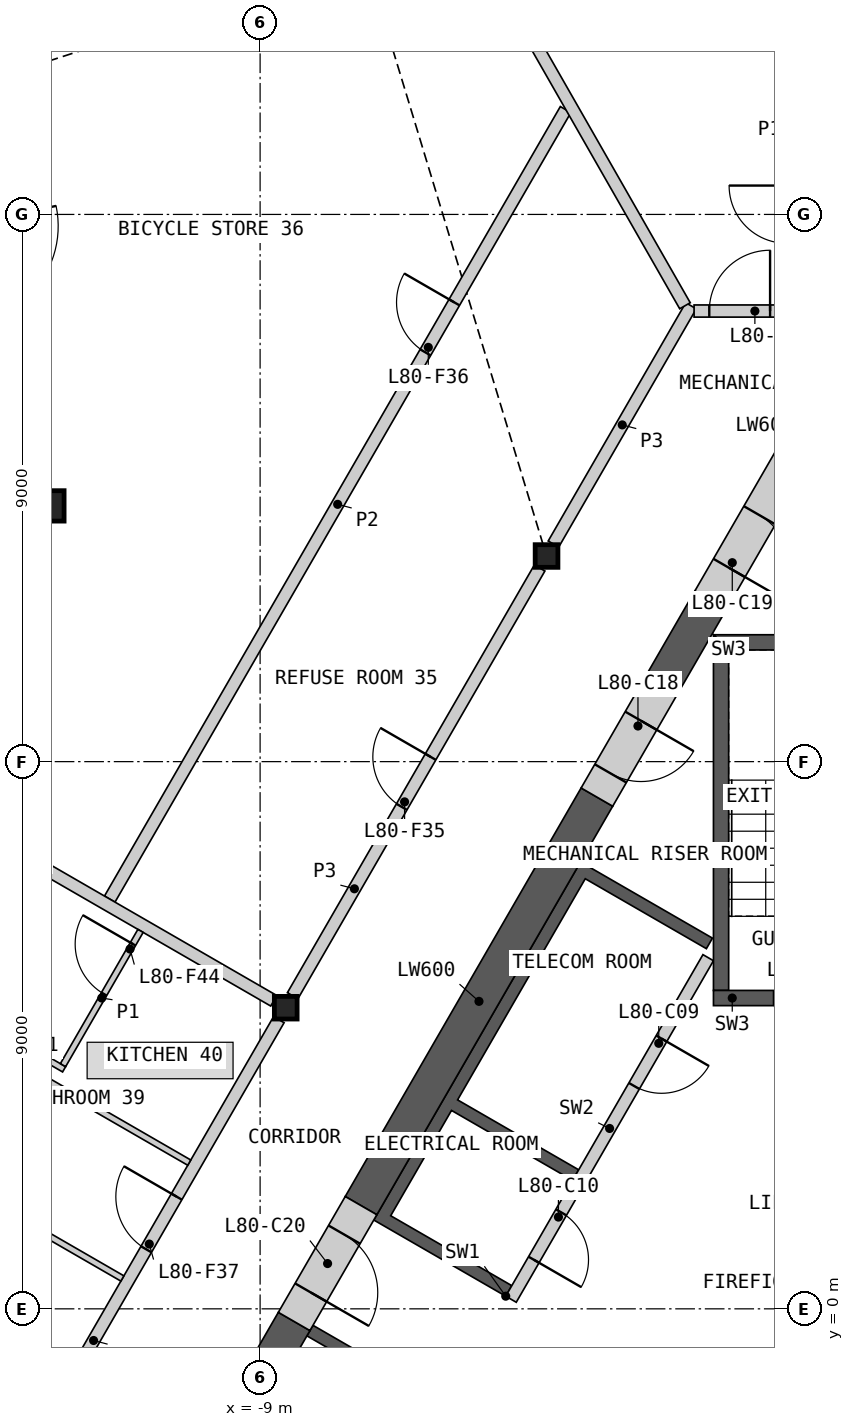
"""IFC4 building model, lengths in metres.
Left out: names, types, materials, properties, quantities, classifications, styles, units other than length and angle.
Written with IfcOpenShell. Run it as: python <this file> out.ifc"""

import sys

from ifc_helpers import new_model, si_unit, direction, frame, frame_2d, origin, origin_2d, place, context, subcontext, project, spatial, polyline, rectangle, hollow_rectangle, i_section, outline, extrude, element, fill, save


model = new_model("IFC4")
c1 = context("Model", 3, precision=1e-05, world=origin(), true_north=direction((0.0, 1.0)))
c2 = subcontext(c1, "Body", "Model", "MODEL_VIEW")
j1 = project(units=[si_unit("LENGTHUNIT", "METRE"), si_unit("PLANEANGLEUNIT", "RADIAN")], contexts=[c1])
p1 = place(None, origin())
s1 = spatial("IfcSite", under=j1, at=p1, CompositionType="ELEMENT")
p2 = place(p1, origin())
s2 = spatial("IfcBuilding", under=s1, at=p2, CompositionType="ELEMENT")
p3 = place(p2, frame((0.0, 0.0, 361.0)))
s3 = spatial("IfcBuildingStorey", under=s2, at=p3, CompositionType="ELEMENT", Elevation=361.0)
p4 = place(p3, frame((-12.474, 13.206, 0.0), z_axis=(0.0, 0.0, 1.0), x_axis=(1.0, 0.0, 0.0)))
e1 = element("IfcColumn", 1, at=p4, inside=s3, PredefinedType="COLUMN", context=c2, shape_type="SweptSolid", body=[
    extrude(hollow_rectangle(XDim=0.5, YDim=0.5, WallThickness=0.03, at=origin_2d()), origin(), (0.0, 0.0, 1.0), 3.4),
])
for number, where, z_axis, x_axis in (
    (2, (-4.289, 12.382, 0.0), (0.0, 0.0, 1.0), (1.0, 0.0, 0.0)),
    (3, (-8.578, 4.953, 0.0), (0.0, 0.0, 1.0), (1.0, 0.0, 0.0)),
):
    element("IfcColumn", number, at=place(p3, frame(where, z_axis=z_axis, x_axis=x_axis)), inside=s3, PredefinedType="COLUMN", context=c2, shape_type="SweptSolid", body=[
        extrude(i_section(OverallWidth=0.374, OverallDepth=0.372, WebThickness=0.016, FlangeThickness=0.026, at=origin_2d()), origin(), (0.0, 0.0, 1.0), 3.4),
    ])
p5 = place(p3, origin())
e4 = element("IfcWall", 4, at=p5, inside=s3, PredefinedType="SHEAR", context=c2, shape_type="SweptSolid", body=[
    extrude(outline(polyline([(-6.061, -1.697), (-8.231, -0.444), (-8.131, -0.271), (-5.96, -1.524), (-6.061, -1.697)])), origin(), (0.0, 0.0, 1.0), 3.1),
])
p6 = place(p3, origin())
e5 = element("IfcWall", 5, at=p6, inside=s3, PredefinedType="SHEAR", context=c2, shape_type="SweptSolid", body=[
    extrude(outline(polyline([(-4.96, 0.208), (-7.131, 1.461), (-3.731, 7.35), (-1.561, 6.097), (-1.66, 5.924), (-3.652, 7.074), (-5.752, 3.437), (-3.76, 2.287), (-3.861, 2.113), (-5.852, 3.263), (-6.852, 1.531), (-4.861, 0.381), (-4.96, 0.208)])), origin(), (0.0, 0.0, 1.0), 3.1),
])
p7 = place(p3, frame((-1.631, 5.776, 0.0), z_axis=(0.0, 0.0, 1.0), x_axis=(-0.499992876559, -0.866029516466, 0.0)))
e6 = element("IfcWall", 6, at=p7, inside=s3, PredefinedType="SOLIDWALL", context=c2, shape_type="SweptSolid", body=[
    extrude(rectangle(XDim=6.486, YDim=0.2, at=frame_2d((3.243, 0.0))), origin(), (0.0, 0.0, 1.0), 3.1),
])
p8 = place(p7, frame((1.537, 0.0, 0.0)))
e7 = element("IfcOpeningElement", 7, at=p8, cuts=e6, PredefinedType="OPENING", context=c2, shape_type="SweptSolid", body=[
    extrude(rectangle(XDim=0.9, YDim=2.1, at=frame_2d((0.45, 1.05))), frame((0.0, 0.11, 0.0), z_axis=(0.0, -1.0, 0.0), x_axis=(1.0, 0.0, 0.0)), (0.0, 0.0, 1.0), 0.22),
])
p9 = place(p7, frame((4.837, 0.0, 0.0)))
e8 = element("IfcOpeningElement", 8, at=p9, cuts=e6, PredefinedType="OPENING", context=c2, shape_type="SweptSolid", body=[
    extrude(rectangle(XDim=0.9, YDim=2.1, at=frame_2d((0.45, 1.05))), frame((0.0, 0.11, 0.0), z_axis=(0.0, -1.0, 0.0), x_axis=(1.0, 0.0, 0.0)), (0.0, 0.0, 1.0), 0.22),
])
p10 = place(p3, origin())
e9 = element("IfcWall", 9, at=p10, inside=s3, PredefinedType="SHEAR", context=c2, shape_type="SweptSolid", body=[
    extrude(outline(polyline([(1.544, 11.087), (-1.544, 11.087), (-1.294, 10.837), (1.294, 10.837), (1.544, 11.087)])), origin(), (0.0, 0.0, 1.0), 3.1),
])
p11 = place(p3, origin())
e10 = element("IfcWall", 10, at=p11, inside=s3, PredefinedType="SHEAR", context=c2, shape_type="SweptSolid", body=[
    extrude(outline(polyline([(-1.294, 10.837), (-1.544, 11.087), (-1.544, 5.237), (-1.294, 5.237), (-1.294, 10.837)])), origin(), (0.0, 0.0, 1.0), 3.1),
])
p12 = place(p3, frame((1.544, 5.112, 0.0), z_axis=(0.0, 0.0, 1.0), x_axis=(-1.0, 0.0, 0.0)))
e11 = element("IfcWall", 11, at=p12, inside=s3, PredefinedType="SHEAR", context=c2, shape_type="SweptSolid", body=[
    extrude(rectangle(XDim=3.088, YDim=0.25, at=frame_2d((1.544, 0.0))), origin(), (0.0, 0.0, 1.0), 3.1),
])
p13 = place(p12, frame((0.994, 0.0, 0.0)))
e12 = element("IfcOpeningElement", 12, at=p13, cuts=e11, PredefinedType="OPENING", context=c2, shape_type="SweptSolid", body=[
    extrude(rectangle(XDim=1.1, YDim=2.1, at=frame_2d((0.55, 1.05))), frame((0.0, 0.135, 0.0), z_axis=(0.0, -1.0, 0.0), x_axis=(1.0, 0.0, 0.0)), (0.0, 0.0, 1.0), 0.27),
])
p14 = place(p3, frame((-3.461, 8.417, 0.0), z_axis=(0.0, 0.0, 1.0), x_axis=(-0.50000391502, -0.866023143435, 0.0)))
e13 = element("IfcWall", 13, at=p14, inside=s3, PredefinedType="SHEAR", context=c2, shape_type="SweptSolid", body=[
    extrude(rectangle(XDim=7.759, YDim=0.6, at=frame_2d((3.879, 0.0))), origin(), (0.0, 0.0, 1.0), 3.1),
])
p15 = place(p3, frame((-8.44, -0.208, 0.0), z_axis=(0.0, 0.0, 1.0), x_axis=(-0.500007425856, -0.866021116422, 0.0)))
e14 = element("IfcWall", 14, at=p15, inside=s3, PredefinedType="SHEAR", context=c2, shape_type="SweptSolid", body=[
    extrude(rectangle(XDim=4.969, YDim=0.6, at=frame_2d((2.484, 0.0))), origin(), (0.0, 0.0, 1.0), 3.1),
])
p16 = place(p3, frame((-1.59, 11.658, 0.0), z_axis=(0.0, 0.0, 1.0), x_axis=(-0.500037594623, -0.866003697431, 0.0)))
e15 = element("IfcWall", 15, at=p16, inside=s3, PredefinedType="SHEAR", context=c2, shape_type="SweptSolid", body=[
    extrude(rectangle(XDim=1.542, YDim=0.6, at=frame_2d((0.771, 0.0))), origin(), (0.0, 0.0, 1.0), 3.1),
])
p17 = place(p3, frame((-2.361, 10.322, 0.0), z_axis=(0.0, 0.0, 1.0), x_axis=(-0.499946605688, -0.86605622881, 0.0)))
e16 = element("IfcWall", 16, at=p17, inside=s3, PredefinedType="SHEAR", context=c2, shape_type="SweptSolid", body=[
    extrude(rectangle(XDim=2.2, YDim=0.6, at=frame_2d((1.1, 0.0))), origin(), (0.0, 0.0, 1.0), 3.1),
])
p18 = place(p17, frame((0.75, 0.0, 0.0)))
e17 = element("IfcOpeningElement", 17, at=p18, cuts=e16, PredefinedType="OPENING", context=c2, shape_type="SweptSolid", body=[
    extrude(rectangle(XDim=1.0, YDim=2.1, at=frame_2d((0.5, 1.05))), frame((0.0, 0.31, 0.0), z_axis=(0.0, -1.0, 0.0), x_axis=(1.0, 0.0, 0.0)), (0.0, 0.0, 1.0), 0.62),
])
p19 = place(p3, frame((-0.26, 13.961, 0.0), z_axis=(0.0, 0.0, 1.0), x_axis=(-0.49997936161, -0.866037319036, 0.0)))
e18 = element("IfcWall", 18, at=p19, inside=s3, PredefinedType="SHEAR", context=c2, shape_type="SweptSolid", body=[
    extrude(rectangle(XDim=2.66, YDim=0.6, at=frame_2d((1.33, 0.0))), origin(), (0.0, 0.0, 1.0), 3.1),
])
p20 = place(p19, frame((1.05, 0.0, 0.0)))
e19 = element("IfcOpeningElement", 19, at=p20, cuts=e18, PredefinedType="OPENING", context=c2, shape_type="SweptSolid", body=[
    extrude(rectangle(XDim=1.0, YDim=2.1, at=frame_2d((0.5, 1.05))), frame((0.0, 0.31, 0.0), z_axis=(0.0, -1.0, 0.0), x_axis=(1.0, 0.0, 0.0)), (0.0, 0.0, 1.0), 0.62),
])
p21 = place(p3, frame((-7.34, 1.698, 0.0), z_axis=(0.0, 0.0, 1.0), x_axis=(-0.50002983664, -0.866008176907, 0.0)))
e20 = element("IfcWall", 20, at=p21, inside=s3, PredefinedType="SHEAR", context=c2, shape_type="SweptSolid", body=[
    extrude(rectangle(XDim=2.2, YDim=0.6, at=frame_2d((1.1, 0.0))), origin(), (0.0, 0.0, 1.0), 3.1),
])
p22 = place(p21, frame((0.55, 0.0, 0.0)))
e21 = element("IfcOpeningElement", 21, at=p22, cuts=e20, PredefinedType="OPENING", context=c2, shape_type="SweptSolid", body=[
    extrude(rectangle(XDim=1.1, YDim=2.1, at=frame_2d((0.55, 1.05))), frame((0.0, 0.31, 0.0), z_axis=(0.0, -1.0, 0.0), x_axis=(1.0, 0.0, 0.0)), (0.0, 0.0, 1.0), 0.62),
])
p23 = place(p3, frame((-8.465, 5.15, 0.0), z_axis=(0.0, 0.0, 1.0), x_axis=(0.499992155518, 0.866029932751, 0.0)))
e22 = element("IfcWall", 22, at=p23, inside=s3, PredefinedType="PARTITIONING", context=c2, shape_type="SweptSolid", body=[
    extrude(rectangle(XDim=8.123, YDim=0.2, at=frame_2d((4.062, 0.0))), origin(), (0.0, 0.0, 1.0), 3.1),
])
p24 = place(p23, frame((3.587, 0.0, 0.0)))
e23 = element("IfcOpeningElement", 23, at=p24, cuts=e22, PredefinedType="OPENING", context=c2, shape_type="SweptSolid", body=[
    extrude(rectangle(XDim=0.95, YDim=2.1, at=frame_2d((0.475, 1.05))), frame((0.0, 0.11, 0.0), z_axis=(0.0, -1.0, 0.0), x_axis=(1.0, 0.0, 0.0)), (0.0, 0.0, 1.0), 0.22),
])
p25 = place(p3, frame((-12.754, -2.279, 0.0), z_axis=(0.0, 0.0, 1.0), x_axis=(0.500001682468, 0.866024432409, 0.0)))
e24 = element("IfcWall", 24, at=p25, inside=s3, PredefinedType="PARTITIONING", context=c2, shape_type="SweptSolid", body=[
    extrude(rectangle(XDim=8.124, YDim=0.2, at=frame_2d((4.062, 0.0))), origin(), (0.0, 0.0, 1.0), 3.1),
])
p26 = place(p25, frame((3.762, 0.0, 0.0)))
e25 = element("IfcOpeningElement", 25, at=p26, cuts=e24, PredefinedType="OPENING", context=c2, shape_type="SweptSolid", body=[
    extrude(rectangle(XDim=1.0, YDim=2.1, at=frame_2d((0.5, 1.05))), frame((0.0, 0.11, 0.0), z_axis=(0.0, -1.0, 0.0), x_axis=(1.0, 0.0, 0.0)), (0.0, 0.0, 1.0), 0.22),
])
p27 = place(p3, frame((-4.176, 12.579, 0.0), z_axis=(0.0, 0.0, 1.0), x_axis=(0.499974648164, 0.866040040179, 0.0)))
e26 = element("IfcWall", 26, at=p27, inside=s3, PredefinedType="PARTITIONING", context=c2, shape_type="SweptSolid", body=[
    extrude(rectangle(XDim=4.525, YDim=0.2, at=frame_2d((2.263, 0.0))), origin(), (0.0, 0.0, 1.0), 3.1),
])
p28 = place(p3, frame((-1.863, 16.411, 0.0), z_axis=(0.0, 0.0, 1.0), x_axis=(1.0, 0.0, 0.0)))
e27 = element("IfcWall", 27, at=p28, inside=s3, PredefinedType="PARTITIONING", context=c2, shape_type="SweptSolid", body=[
    extrude(rectangle(XDim=3.701, YDim=0.2, at=frame_2d((1.851, 0.0))), origin(), (0.0, 0.0, 1.0), 3.1),
])
p29 = place(p28, frame((0.25, 0.0, 0.0)))
e28 = element("IfcOpeningElement", 28, at=p29, cuts=e27, PredefinedType="OPENING", context=c2, shape_type="SweptSolid", body=[
    extrude(rectangle(XDim=1.0, YDim=2.1, at=frame_2d((0.5, 1.05))), frame((0.0, 0.11, 0.0), z_axis=(0.0, -1.0, 0.0), x_axis=(1.0, 0.0, 0.0)), (0.0, 0.0, 1.0), 0.22),
])
p30 = place(p3, frame((-11.473, 6.74, 0.0), z_axis=(0.0, 0.0, 1.0), x_axis=(0.499993542657, 0.866029131901, 0.0)))
e29 = element("IfcWall", 29, at=p30, inside=s3, PredefinedType="PARTITIONING", context=c2, shape_type="SweptSolid", body=[
    extrude(rectangle(XDim=14.994, YDim=0.2, at=frame_2d((7.497, 0.0))), origin(), (0.0, 0.0, 1.0), 2.33),
])
p31 = place(p30, frame((10.383, 0.0, 0.0)))
e30 = element("IfcOpeningElement", 30, at=p31, cuts=e29, PredefinedType="OPENING", context=c2, shape_type="SweptSolid", body=[
    extrude(rectangle(XDim=0.95, YDim=2.1, at=frame_2d((0.475, 1.05))), frame((0.0, 0.11, 0.0), z_axis=(0.0, -1.0, 0.0), x_axis=(1.0, 0.0, 0.0)), (0.0, 0.0, 1.0), 0.22),
])
p32 = place(p3, frame((-9.362, 29.352, 0.0), z_axis=(0.0, 0.0, 1.0), x_axis=(0.496351997927, -0.868121359116, 0.0)))
e31 = element("IfcWall", 31, at=p32, inside=s3, PredefinedType="PARTITIONING", context=c2, shape_type="SweptSolid", body=[
    extrude(rectangle(XDim=14.807, YDim=0.2, at=frame_2d((7.404, 0.0))), origin(), (0.0, 0.0, 1.0), 2.33),
])
p33 = place(p3, frame((-18.869, 10.894, 0.0), z_axis=(0.0, 0.0, 1.0), x_axis=(0.866023724155, -0.500002909193, 0.0)))
e32 = element("IfcWall", 32, at=p33, inside=s3, PredefinedType="PARTITIONING", context=c2, shape_type="SweptSolid", body=[
    extrude(rectangle(XDim=11.655, YDim=0.2, at=frame_2d((5.827, 0.0))), origin(), (0.0, 0.0, 1.0), 2.33),
])
p34 = place(p3, frame((-17.414, 4.049, 0.0), z_axis=(0.0, 0.0, 1.0), x_axis=(0.866033839264, -0.499985389037, 0.0)))
e33 = element("IfcWall", 33, at=p34, inside=s3, PredefinedType="PARTITIONING", context=c2, shape_type="SweptSolid", body=[
    extrude(rectangle(XDim=7.1, YDim=0.1, at=frame_2d((3.55, 0.0))), origin(), (0.0, 0.0, 1.0), 2.33),
])
p35 = place(p34, frame((1.158, 0.0, 0.0)))
e34 = element("IfcOpeningElement", 34, at=p35, cuts=e33, PredefinedType="OPENING", context=c2, shape_type="SweptSolid", body=[
    extrude(rectangle(XDim=0.95, YDim=2.1, at=frame_2d((0.475, 1.05))), frame((0.0, 0.06, 0.0), z_axis=(0.0, -1.0, 0.0), x_axis=(1.0, 0.0, 0.0)), (0.0, 0.0, 1.0), 0.12),
])
p36 = place(p3, frame((-15.318, 5.38, 0.0), z_axis=(0.0, 0.0, 1.0), x_axis=(0.866035260786, -0.499982926783, 0.0)))
e35 = element("IfcWall", 35, at=p36, inside=s3, PredefinedType="PARTITIONING", context=c2, shape_type="SweptSolid", body=[
    extrude(rectangle(XDim=5.95, YDim=0.1, at=frame_2d((2.975, 0.0))), origin(), (0.0, 0.0, 1.0), 2.33),
])
p37 = place(p3, frame((-14.735, 5.389, 0.0), z_axis=(0.0, 0.0, 1.0), x_axis=(0.866032775405, -0.499987231761, 0.0)))
e36 = element("IfcWall", 36, at=p37, inside=s3, PredefinedType="PARTITIONING", context=c2, shape_type="SweptSolid", body=[
    extrude(rectangle(XDim=2.9, YDim=0.1, at=frame_2d((1.45, 0.0))), origin(), (0.0, 0.0, 1.0), 2.33),
])
p38 = place(p3, frame((-12.242, 4.008, 0.0), z_axis=(0.0, 0.0, 1.0), x_axis=(0.499948979701, 0.866054858364, 0.0)))
e37 = element("IfcWall", 37, at=p38, inside=s3, PredefinedType="PARTITIONING", context=c2, shape_type="SweptSolid", body=[
    extrude(rectangle(XDim=2.55, YDim=0.1, at=frame_2d((1.275, 0.0))), origin(), (0.0, 0.0, 1.0), 2.33),
])
p39 = place(p38, frame((1.35, 0.0, 0.0)))
e38 = element("IfcOpeningElement", 38, at=p39, cuts=e37, PredefinedType="OPENING", context=c2, shape_type="SweptSolid", body=[
    extrude(rectangle(XDim=0.95, YDim=2.1, at=frame_2d((0.475, 1.05))), frame((0.0, 0.06, 0.0), z_axis=(0.0, -1.0, 0.0), x_axis=(1.0, 0.0, 0.0)), (0.0, 0.0, 1.0), 0.12),
])
p40 = place(p8, origin())
e39 = element("IfcDoor", 39, at=p40, inside=s3, OperationType="SINGLE_SWING_LEFT", PredefinedType="DOOR", context=c2, shape_type="SweptSolid", body=[
    extrude(rectangle(XDim=0.9, YDim=2.1, at=frame_2d((0.45, 1.05))), frame((0.0, 0.025, 0.0), z_axis=(0.0, -1.0, 0.0), x_axis=(1.0, 0.0, 0.0)), (0.0, 0.0, 1.0), 0.05),
])
fill(e7, e39)
p41 = place(p9, origin())
e40 = element("IfcDoor", 40, at=p41, inside=s3, OperationType="SINGLE_SWING_RIGHT", PredefinedType="DOOR", context=c2, shape_type="SweptSolid", body=[
    extrude(rectangle(XDim=0.9, YDim=2.1, at=frame_2d((0.45, 1.05))), frame((0.0, 0.025, 0.0), z_axis=(0.0, -1.0, 0.0), x_axis=(1.0, 0.0, 0.0)), (0.0, 0.0, 1.0), 0.05),
])
fill(e8, e40)
p42 = place(p13, origin())
e41 = element("IfcDoor", 41, at=p42, inside=s3, OperationType="SINGLE_SWING_LEFT", PredefinedType="DOOR", context=c2, shape_type="SweptSolid", body=[
    extrude(rectangle(XDim=1.1, YDim=2.1, at=frame_2d((0.55, 1.05))), frame((0.0, 0.025, 0.0), z_axis=(0.0, -1.0, 0.0), x_axis=(1.0, 0.0, 0.0)), (0.0, 0.0, 1.0), 0.05),
])
fill(e12, e41)
p43 = place(p18, origin())
e42 = element("IfcDoor", 42, at=p43, inside=s3, OperationType="SINGLE_SWING_LEFT", PredefinedType="DOOR", context=c2, shape_type="SweptSolid", body=[
    extrude(rectangle(XDim=1.0, YDim=2.1, at=frame_2d((0.5, 1.05))), frame((0.0, 0.055, 0.0), z_axis=(0.0, -1.0, 0.0), x_axis=(1.0, 0.0, 0.0)), (0.0, 0.0, 1.0), 0.05),
])
fill(e17, e42)
p44 = place(p20, origin())
e43 = element("IfcDoor", 43, at=p44, inside=s3, OperationType="SINGLE_SWING_RIGHT", PredefinedType="DOOR", context=c2, shape_type="SweptSolid", body=[
    extrude(rectangle(XDim=1.0, YDim=2.1, at=frame_2d((0.5, 1.05))), frame((0.0, 0.055, 0.0), z_axis=(0.0, -1.0, 0.0), x_axis=(1.0, 0.0, 0.0)), (0.0, 0.0, 1.0), 0.05),
])
fill(e19, e43)
p45 = place(p22, origin())
e44 = element("IfcDoor", 44, at=p45, inside=s3, OperationType="SINGLE_SWING_RIGHT", PredefinedType="DOOR", context=c2, shape_type="SweptSolid", body=[
    extrude(rectangle(XDim=1.1, YDim=2.1, at=frame_2d((0.55, 1.05))), frame((0.0, 0.055, 0.0), z_axis=(0.0, -1.0, 0.0), x_axis=(1.0, 0.0, 0.0)), (0.0, 0.0, 1.0), 0.05),
])
fill(e21, e44)
p46 = place(p29, origin())
e45 = element("IfcDoor", 45, at=p46, inside=s3, OperationType="SINGLE_SWING_RIGHT", PredefinedType="DOOR", context=c2, shape_type="SweptSolid", body=[
    extrude(rectangle(XDim=1.0, YDim=2.1, at=frame_2d((0.5, 1.05))), frame((0.0, 0.025, 0.0), z_axis=(0.0, -1.0, 0.0), x_axis=(1.0, 0.0, 0.0)), (0.0, 0.0, 1.0), 0.05),
])
fill(e28, e45)
p47 = place(p24, origin())
e46 = element("IfcDoor", 46, at=p47, inside=s3, OperationType="SINGLE_SWING_RIGHT", PredefinedType="DOOR", context=c2, shape_type="SweptSolid", body=[
    extrude(rectangle(XDim=0.95, YDim=2.1, at=frame_2d((0.475, 1.05))), frame((0.0, 0.025, 0.0), z_axis=(0.0, -1.0, 0.0), x_axis=(1.0, 0.0, 0.0)), (0.0, 0.0, 1.0), 0.05),
])
fill(e23, e46)
p48 = place(p31, origin())
e47 = element("IfcDoor", 47, at=p48, inside=s3, OperationType="SINGLE_SWING_RIGHT", PredefinedType="DOOR", context=c2, shape_type="SweptSolid", body=[
    extrude(rectangle(XDim=0.95, YDim=2.1, at=frame_2d((0.475, 1.05))), frame((0.0, 0.025, 0.0), z_axis=(0.0, -1.0, 0.0), x_axis=(1.0, 0.0, 0.0)), (0.0, 0.0, 1.0), 0.05),
])
fill(e30, e47)
p49 = place(p26, origin())
e48 = element("IfcDoor", 48, at=p49, inside=s3, OperationType="SINGLE_SWING_RIGHT", PredefinedType="DOOR", context=c2, shape_type="SweptSolid", body=[
    extrude(rectangle(XDim=1.0, YDim=2.1, at=frame_2d((0.5, 1.05))), frame((0.0, 0.025, 0.0), z_axis=(0.0, -1.0, 0.0), x_axis=(1.0, 0.0, 0.0)), (0.0, 0.0, 1.0), 0.05),
])
fill(e25, e48)
p50 = place(p39, origin())
e49 = element("IfcDoor", 49, at=p50, inside=s3, OperationType="SINGLE_SWING_RIGHT", PredefinedType="DOOR", context=c2, shape_type="SweptSolid", body=[
    extrude(rectangle(XDim=0.95, YDim=2.1, at=frame_2d((0.475, 1.05))), frame((0.0, 0.025, 0.0), z_axis=(0.0, -1.0, 0.0), x_axis=(1.0, 0.0, 0.0)), (0.0, 0.0, 1.0), 0.05),
])
fill(e38, e49)
save(model, sys.argv[1])
